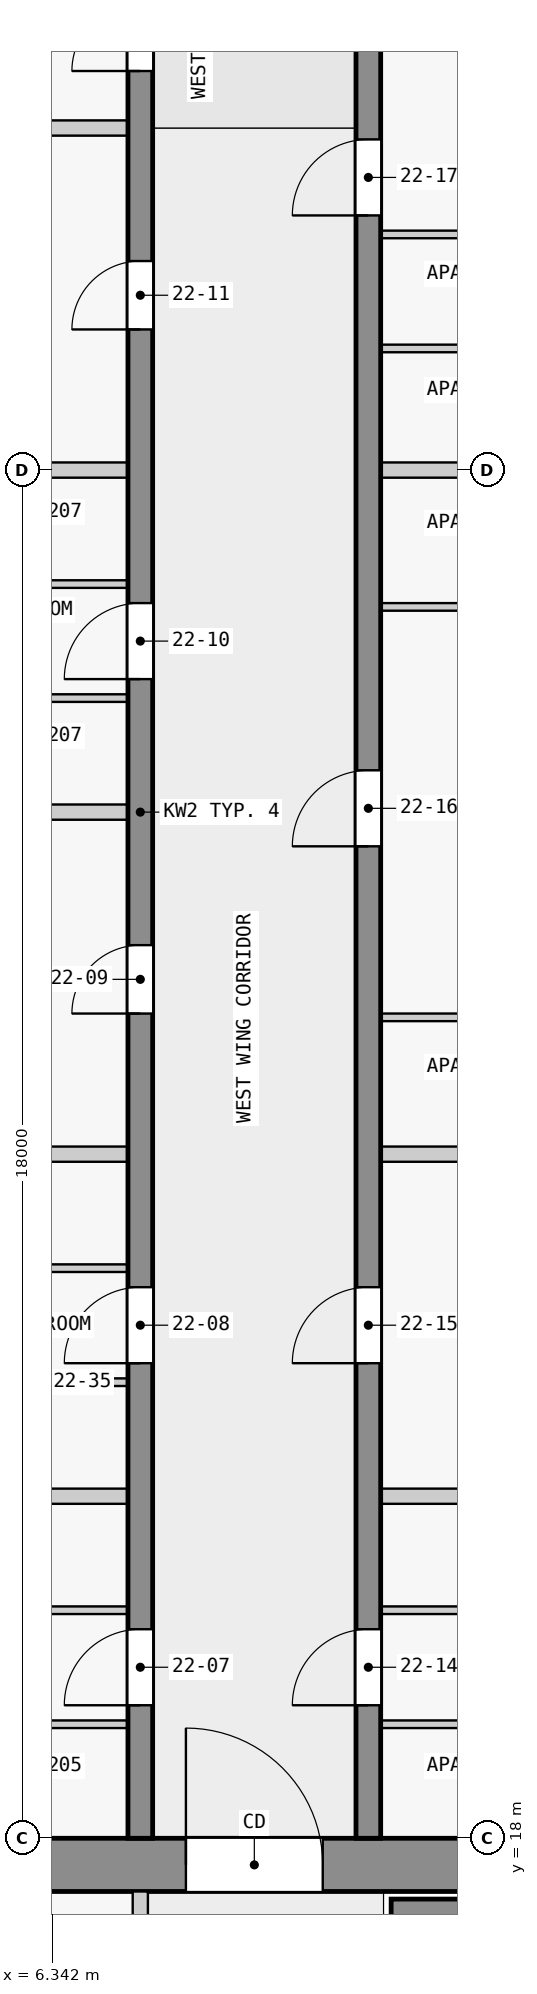
"""IFC4 building model, lengths in metres.
Left out: names, types, materials, properties, quantities, classifications, styles, units other than length and angle.
Written with IfcOpenShell. Run it as: python <this file> out.ifc"""

import sys

from ifc_helpers import new_model, si_unit, direction, frame, frame_2d, origin, place, context, subcontext, project, spatial, rectangle, extrude, element, fill, save


model = new_model("IFC4")
c1 = context("Model", 3, precision=1e-05, world=origin(), true_north=direction((0.0, 1.0)))
c2 = subcontext(c1, "Body", "Model", "MODEL_VIEW")
j1 = project(units=[si_unit("LENGTHUNIT", "METRE"), si_unit("PLANEANGLEUNIT", "RADIAN")], contexts=[c1])
p1 = place(None, origin())
s1 = spatial("IfcSite", under=j1, at=p1, CompositionType="ELEMENT")
p2 = place(p1, origin())
s2 = spatial("IfcBuilding", under=s1, at=p2, CompositionType="ELEMENT")
p3 = place(p2, frame((0.0, 0.0, 88.8)))
s3 = spatial("IfcBuildingStorey", under=s2, at=p3, CompositionType="ELEMENT", Elevation=88.8)
p4 = place(p3, frame((1.6, 17.65, 0.0), z_axis=(0.0, 0.0, 1.0), x_axis=(1.0, 0.0, 0.0)))
e1 = element("IfcWall", 1, at=p4, inside=s3, PredefinedType="SHEAR", context=c2, shape_type="SweptSolid", body=[
    extrude(rectangle(XDim=20.9, YDim=0.7, at=frame_2d((10.45, 0.0))), origin(), (0.0, 0.0, 1.0), 3.25),
])
p5 = place(p4, frame((6.5, 0.0, 0.0)))
e2 = element("IfcOpeningElement", 2, at=p5, cuts=e1, PredefinedType="OPENING", context=c2, shape_type="SweptSolid", body=[
    extrude(rectangle(XDim=1.8, YDim=2.1, at=frame_2d((0.9, 1.05))), frame((0.0, 0.36, 0.0), z_axis=(0.0, -1.0, 0.0), x_axis=(1.0, 0.0, 0.0)), (0.0, 0.0, 1.0), 0.72),
])
p6 = place(p3, frame((10.8, 17.05, 0.0), z_axis=(0.0, 0.0, 1.0), x_axis=(1.0, 0.0, 0.0)))
e3 = element("IfcWall", 3, at=p6, inside=s3, PredefinedType="SHEAR", context=c2, shape_type="SweptSolid", body=[
    extrude(rectangle(XDim=7.8, YDim=0.3, at=frame_2d((3.9, 0.0))), origin(), (0.0, 0.0, 1.0), 3.25),
])
p7 = place(p3, frame((7.5, 18.0, 0.0), z_axis=(0.0, 0.0, 1.0), x_axis=(0.0, 1.0, 0.0)))
e4 = element("IfcWall", 4, at=p7, inside=s3, PredefinedType="SHEAR", context=c2, shape_type="SweptSolid", body=[
    extrude(rectangle(XDim=27.0, YDim=0.325, at=frame_2d((13.5, 0.0))), origin(), (0.0, 0.0, 1.0), 3.25),
])
p8 = place(p7, frame((1.75, 0.0, 0.0)))
e5 = element("IfcOpeningElement", 5, at=p8, cuts=e4, PredefinedType="OPENING", context=c2, shape_type="SweptSolid", body=[
    extrude(rectangle(XDim=1.0, YDim=2.1, at=frame_2d((0.5, 1.05))), frame((0.0, 0.172, 0.0), z_axis=(0.0, -1.0, 0.0), x_axis=(1.0, 0.0, 0.0)), (0.0, 0.0, 1.0), 0.345),
])
p9 = place(p7, frame((6.25, 0.0, 0.0)))
e6 = element("IfcOpeningElement", 6, at=p9, cuts=e4, PredefinedType="OPENING", context=c2, shape_type="SweptSolid", body=[
    extrude(rectangle(XDim=1.0, YDim=2.1, at=frame_2d((0.5, 1.05))), frame((0.0, 0.172, 0.0), z_axis=(0.0, -1.0, 0.0), x_axis=(1.0, 0.0, 0.0)), (0.0, 0.0, 1.0), 0.345),
])
p10 = place(p7, frame((10.85, 0.0, 0.0)))
e7 = element("IfcOpeningElement", 7, at=p10, cuts=e4, PredefinedType="OPENING", context=c2, shape_type="SweptSolid", body=[
    extrude(rectangle(XDim=0.9, YDim=2.1, at=frame_2d((0.45, 1.05))), frame((0.0, 0.172, 0.0), z_axis=(0.0, -1.0, 0.0), x_axis=(1.0, 0.0, 0.0)), (0.0, 0.0, 1.0), 0.345),
])
p11 = place(p7, frame((15.25, 0.0, 0.0)))
e8 = element("IfcOpeningElement", 8, at=p11, cuts=e4, PredefinedType="OPENING", context=c2, shape_type="SweptSolid", body=[
    extrude(rectangle(XDim=1.0, YDim=2.1, at=frame_2d((0.5, 1.05))), frame((0.0, 0.172, 0.0), z_axis=(0.0, -1.0, 0.0), x_axis=(1.0, 0.0, 0.0)), (0.0, 0.0, 1.0), 0.345),
])
p12 = place(p7, frame((19.85, 0.0, 0.0)))
e9 = element("IfcOpeningElement", 9, at=p12, cuts=e4, PredefinedType="OPENING", context=c2, shape_type="SweptSolid", body=[
    extrude(rectangle(XDim=0.9, YDim=2.1, at=frame_2d((0.45, 1.05))), frame((0.0, 0.172, 0.0), z_axis=(0.0, -1.0, 0.0), x_axis=(1.0, 0.0, 0.0)), (0.0, 0.0, 1.0), 0.345),
])
p13 = place(p7, frame((23.25, 0.0, 0.0)))
e10 = element("IfcOpeningElement", 10, at=p13, cuts=e4, PredefinedType="OPENING", context=c2, shape_type="SweptSolid", body=[
    extrude(rectangle(XDim=0.9, YDim=2.1, at=frame_2d((0.45, 1.05))), frame((0.0, 0.172, 0.0), z_axis=(0.0, -1.0, 0.0), x_axis=(1.0, 0.0, 0.0)), (0.0, 0.0, 1.0), 0.345),
])
p14 = place(p7, frame((25.45, 0.0, 0.0)))
e11 = element("IfcOpeningElement", 11, at=p14, cuts=e4, PredefinedType="OPENING", context=c2, shape_type="SweptSolid", body=[
    extrude(rectangle(XDim=1.0, YDim=2.1, at=frame_2d((0.5, 1.05))), frame((0.0, 0.172, 0.0), z_axis=(0.0, -1.0, 0.0), x_axis=(1.0, 0.0, 0.0)), (0.0, 0.0, 1.0), 0.345),
])
p15 = place(p3, frame((10.5, 18.0, 0.0), z_axis=(0.0, 0.0, 1.0), x_axis=(0.0, 1.0, 0.0)))
e12 = element("IfcWall", 12, at=p15, inside=s3, PredefinedType="SHEAR", context=c2, shape_type="SweptSolid", body=[
    extrude(rectangle(XDim=27.0, YDim=0.325, at=frame_2d((13.5, 0.0))), origin(), (0.0, 0.0, 1.0), 3.25),
])
p16 = place(p15, frame((1.75, 0.0, 0.0)))
e13 = element("IfcOpeningElement", 13, at=p16, cuts=e12, PredefinedType="OPENING", context=c2, shape_type="SweptSolid", body=[
    extrude(rectangle(XDim=1.0, YDim=2.1, at=frame_2d((0.5, 1.05))), frame((0.0, 0.172, 0.0), z_axis=(0.0, -1.0, 0.0), x_axis=(1.0, 0.0, 0.0)), (0.0, 0.0, 1.0), 0.345),
])
p17 = place(p15, frame((6.25, 0.0, 0.0)))
e14 = element("IfcOpeningElement", 14, at=p17, cuts=e12, PredefinedType="OPENING", context=c2, shape_type="SweptSolid", body=[
    extrude(rectangle(XDim=1.0, YDim=2.1, at=frame_2d((0.5, 1.05))), frame((0.0, 0.172, 0.0), z_axis=(0.0, -1.0, 0.0), x_axis=(1.0, 0.0, 0.0)), (0.0, 0.0, 1.0), 0.345),
])
p18 = place(p15, frame((13.05, 0.0, 0.0)))
e15 = element("IfcOpeningElement", 15, at=p18, cuts=e12, PredefinedType="OPENING", context=c2, shape_type="SweptSolid", body=[
    extrude(rectangle(XDim=1.0, YDim=2.1, at=frame_2d((0.5, 1.05))), frame((0.0, 0.172, 0.0), z_axis=(0.0, -1.0, 0.0), x_axis=(1.0, 0.0, 0.0)), (0.0, 0.0, 1.0), 0.345),
])
p19 = place(p15, frame((21.35, 0.0, 0.0)))
e16 = element("IfcOpeningElement", 16, at=p19, cuts=e12, PredefinedType="OPENING", context=c2, shape_type="SweptSolid", body=[
    extrude(rectangle(XDim=1.0, YDim=2.1, at=frame_2d((0.5, 1.05))), frame((0.0, 0.172, 0.0), z_axis=(0.0, -1.0, 0.0), x_axis=(1.0, 0.0, 0.0)), (0.0, 0.0, 1.0), 0.345),
])
p20 = place(p3, frame((7.5, 10.1, 0.0), z_axis=(0.0, 0.0, 1.0), x_axis=(0.0, 1.0, 0.0)))
e17 = element("IfcWall", 17, at=p20, inside=s3, PredefinedType="PARTITIONING", context=c2, shape_type="SweptSolid", body=[
    extrude(rectangle(XDim=7.2, YDim=0.2, at=frame_2d((3.6, 0.0))), origin(), (0.0, 0.0, 1.0), 3.25),
])
p21 = place(p20, frame((0.75, 0.0, 0.0)))
e18 = element("IfcOpeningElement", 18, at=p21, cuts=e17, PredefinedType="OPENING", context=c2, shape_type="SweptSolid", body=[
    extrude(rectangle(XDim=0.9, YDim=2.1, at=frame_2d((0.45, 1.05))), frame((0.0, 0.11, 0.0), z_axis=(0.0, -1.0, 0.0), x_axis=(1.0, 0.0, 0.0)), (0.0, 0.0, 1.0), 0.22),
])
p22 = place(p20, frame((3.175, 0.0, 0.0)))
e19 = element("IfcOpeningElement", 19, at=p22, cuts=e17, PredefinedType="OPENING", context=c2, shape_type="SweptSolid", body=[
    extrude(rectangle(XDim=0.9, YDim=2.1, at=frame_2d((0.45, 1.05))), frame((0.0, 0.11, 0.0), z_axis=(0.0, -1.0, 0.0), x_axis=(1.0, 0.0, 0.0)), (0.0, 0.0, 1.0), 0.22),
])
p23 = place(p20, frame((5.25, 0.0, 0.0)))
e20 = element("IfcOpeningElement", 20, at=p23, cuts=e17, PredefinedType="OPENING", context=c2, shape_type="SweptSolid", body=[
    extrude(rectangle(XDim=0.9, YDim=2.1, at=frame_2d((0.45, 1.05))), frame((0.0, 0.11, 0.0), z_axis=(0.0, -1.0, 0.0), x_axis=(1.0, 0.0, 0.0)), (0.0, 0.0, 1.0), 0.22),
])
p24 = place(p3, frame((7.337, 19.5, 0.0), z_axis=(0.0, 0.0, 1.0), x_axis=(-1.0, 0.0, 0.0)))
e21 = element("IfcWall", 21, at=p24, inside=s3, PredefinedType="PARTITIONING", context=c2, shape_type="SweptSolid", body=[
    extrude(rectangle(XDim=3.4, YDim=0.1, at=frame_2d((1.7, 0.0))), origin(), (0.0, 0.0, 1.0), 3.25),
])
p25 = place(p24, frame((1.25, 0.0, 0.0)))
e22 = element("IfcOpeningElement", 22, at=p25, cuts=e21, PredefinedType="OPENING", context=c2, shape_type="SweptSolid", body=[
    extrude(rectangle(XDim=0.9, YDim=2.1, at=frame_2d((0.45, 1.05))), frame((0.0, 0.06, 0.0), z_axis=(0.0, -1.0, 0.0), x_axis=(1.0, 0.0, 0.0)), (0.0, 0.0, 1.0), 0.12),
])
p26 = place(p3, frame((14.062, 19.5, 0.0), z_axis=(0.0, 0.0, 1.0), x_axis=(-1.0, 0.0, 0.0)))
e23 = element("IfcWall", 23, at=p26, inside=s3, PredefinedType="PARTITIONING", context=c2, shape_type="SweptSolid", body=[
    extrude(rectangle(XDim=3.4, YDim=0.1, at=frame_2d((1.7, 0.0))), origin(), (0.0, 0.0, 1.0), 3.25),
])
p27 = place(p26, frame((1.25, 0.0, 0.0)))
e24 = element("IfcOpeningElement", 24, at=p27, cuts=e23, PredefinedType="OPENING", context=c2, shape_type="SweptSolid", body=[
    extrude(rectangle(XDim=0.9, YDim=2.1, at=frame_2d((0.45, 1.05))), frame((0.0, 0.06, 0.0), z_axis=(0.0, -1.0, 0.0), x_axis=(1.0, 0.0, 0.0)), (0.0, 0.0, 1.0), 0.12),
])
p28 = place(p3, frame((3.938, 21.0, 0.0), z_axis=(0.0, 0.0, 1.0), x_axis=(1.0, 0.0, 0.0)))
e25 = element("IfcWall", 25, at=p28, inside=s3, PredefinedType="PARTITIONING", context=c2, shape_type="SweptSolid", body=[
    extrude(rectangle(XDim=3.4, YDim=0.1, at=frame_2d((1.7, 0.0))), origin(), (0.0, 0.0, 1.0), 3.25),
])
p29 = place(p28, frame((1.25, 0.0, 0.0)))
e26 = element("IfcOpeningElement", 26, at=p29, cuts=e25, PredefinedType="OPENING", context=c2, shape_type="SweptSolid", body=[
    extrude(rectangle(XDim=0.9, YDim=2.1, at=frame_2d((0.45, 1.05))), frame((0.0, 0.06, 0.0), z_axis=(0.0, -1.0, 0.0), x_axis=(1.0, 0.0, 0.0)), (0.0, 0.0, 1.0), 0.12),
])
p30 = place(p3, frame((10.663, 21.0, 0.0), z_axis=(0.0, 0.0, 1.0), x_axis=(1.0, 0.0, 0.0)))
e27 = element("IfcWall", 27, at=p30, inside=s3, PredefinedType="PARTITIONING", context=c2, shape_type="SweptSolid", body=[
    extrude(rectangle(XDim=3.4, YDim=0.1, at=frame_2d((1.7, 0.0))), origin(), (0.0, 0.0, 1.0), 3.25),
])
p31 = place(p30, frame((1.25, 0.0, 0.0)))
e28 = element("IfcOpeningElement", 28, at=p31, cuts=e27, PredefinedType="OPENING", context=c2, shape_type="SweptSolid", body=[
    extrude(rectangle(XDim=0.9, YDim=2.1, at=frame_2d((0.45, 1.05))), frame((0.0, 0.06, 0.0), z_axis=(0.0, -1.0, 0.0), x_axis=(1.0, 0.0, 0.0)), (0.0, 0.0, 1.0), 0.12),
])
for number, where, z_axis, x_axis in (
    (29, (7.337, 22.5, 0.0), (0.0, 0.0, 1.0), (-1.0, 0.0, 0.0)),
    (30, (13.962, 22.5, 0.0), (0.0, 0.0, 1.0), (-1.0, 0.0, 0.0)),
):
    element("IfcWall", number, at=place(p3, frame(where, z_axis=z_axis, x_axis=x_axis)), inside=s3, PredefinedType="PARTITIONING", context=c2, shape_type="SweptSolid", body=[
        extrude(rectangle(XDim=3.3, YDim=0.2, at=frame_2d((1.65, 0.0))), origin(), (0.0, 0.0, 1.0), 3.25),
    ])
p32 = place(p3, frame((7.337, 24.0, 0.0), z_axis=(0.0, 0.0, 1.0), x_axis=(-1.0, 0.0, 0.0)))
e31 = element("IfcWall", 31, at=p32, inside=s3, PredefinedType="PARTITIONING", context=c2, shape_type="SweptSolid", body=[
    extrude(rectangle(XDim=3.4, YDim=0.1, at=frame_2d((1.7, 0.0))), origin(), (0.0, 0.0, 1.0), 3.25),
])
p33 = place(p32, frame((1.25, 0.0, 0.0)))
e32 = element("IfcOpeningElement", 32, at=p33, cuts=e31, PredefinedType="OPENING", context=c2, shape_type="SweptSolid", body=[
    extrude(rectangle(XDim=0.9, YDim=2.1, at=frame_2d((0.45, 1.05))), frame((0.0, 0.06, 0.0), z_axis=(0.0, -1.0, 0.0), x_axis=(1.0, 0.0, 0.0)), (0.0, 0.0, 1.0), 0.12),
])
p34 = place(p3, frame((3.938, 25.5, 0.0), z_axis=(0.0, 0.0, 1.0), x_axis=(1.0, 0.0, 0.0)))
e33 = element("IfcWall", 33, at=p34, inside=s3, PredefinedType="PARTITIONING", context=c2, shape_type="SweptSolid", body=[
    extrude(rectangle(XDim=3.4, YDim=0.1, at=frame_2d((1.7, 0.0))), origin(), (0.0, 0.0, 1.0), 3.25),
])
p35 = place(p34, frame((1.25, 0.0, 0.0)))
e34 = element("IfcOpeningElement", 34, at=p35, cuts=e33, PredefinedType="OPENING", context=c2, shape_type="SweptSolid", body=[
    extrude(rectangle(XDim=0.9, YDim=2.1, at=frame_2d((0.45, 1.05))), frame((0.0, 0.06, 0.0), z_axis=(0.0, -1.0, 0.0), x_axis=(1.0, 0.0, 0.0)), (0.0, 0.0, 1.0), 0.12),
])
p36 = place(p3, frame((7.337, 27.0, 0.0), z_axis=(0.0, 0.0, 1.0), x_axis=(-1.0, 0.0, 0.0)))
e35 = element("IfcWall", 35, at=p36, inside=s3, PredefinedType="PARTITIONING", context=c2, shape_type="SweptSolid", body=[
    extrude(rectangle(XDim=3.3, YDim=0.2, at=frame_2d((1.65, 0.0))), origin(), (0.0, 0.0, 1.0), 3.25),
])
p37 = place(p3, frame((18.08, 27.0, 0.0), z_axis=(0.0, 0.0, 1.0), x_axis=(-1.0, 0.0, 0.0)))
e36 = element("IfcWall", 36, at=p37, inside=s3, PredefinedType="PARTITIONING", context=c2, shape_type="SweptSolid", body=[
    extrude(rectangle(XDim=7.417, YDim=0.2, at=frame_2d((3.709, 0.0))), origin(), (0.0, 0.0, 1.0), 3.25),
])
p38 = place(p3, frame((14.062, 28.8, 0.0), z_axis=(0.0, 0.0, 1.0), x_axis=(-1.0, 0.0, 0.0)))
e37 = element("IfcWall", 37, at=p38, inside=s3, PredefinedType="PARTITIONING", context=c2, shape_type="SweptSolid", body=[
    extrude(rectangle(XDim=3.4, YDim=0.1, at=frame_2d((1.7, 0.0))), origin(), (0.0, 0.0, 1.0), 3.25),
])
p39 = place(p38, frame((1.25, 0.0, 0.0)))
e38 = element("IfcOpeningElement", 38, at=p39, cuts=e37, PredefinedType="OPENING", context=c2, shape_type="SweptSolid", body=[
    extrude(rectangle(XDim=0.9, YDim=2.1, at=frame_2d((0.45, 1.05))), frame((0.0, 0.06, 0.0), z_axis=(0.0, -1.0, 0.0), x_axis=(1.0, 0.0, 0.0)), (0.0, 0.0, 1.0), 0.12),
])
p40 = place(p3, frame((7.337, 31.5, 0.0), z_axis=(0.0, 0.0, 1.0), x_axis=(-1.0, 0.0, 0.0)))
e39 = element("IfcWall", 39, at=p40, inside=s3, PredefinedType="PARTITIONING", context=c2, shape_type="SweptSolid", body=[
    extrude(rectangle(XDim=7.188, YDim=0.2, at=frame_2d((3.594, 0.0))), origin(), (0.0, 0.0, 1.0), 3.25),
])
p41 = place(p3, frame((7.337, 33.0, 0.0), z_axis=(0.0, 0.0, 1.0), x_axis=(-1.0, 0.0, 0.0)))
e40 = element("IfcWall", 40, at=p41, inside=s3, PredefinedType="PARTITIONING", context=c2, shape_type="SweptSolid", body=[
    extrude(rectangle(XDim=3.4, YDim=0.1, at=frame_2d((1.7, 0.0))), origin(), (0.0, 0.0, 1.0), 3.25),
])
p42 = place(p41, frame((1.25, 0.0, 0.0)))
e41 = element("IfcOpeningElement", 41, at=p42, cuts=e40, PredefinedType="OPENING", context=c2, shape_type="SweptSolid", body=[
    extrude(rectangle(XDim=0.9, YDim=2.1, at=frame_2d((0.45, 1.05))), frame((0.0, 0.06, 0.0), z_axis=(0.0, -1.0, 0.0), x_axis=(1.0, 0.0, 0.0)), (0.0, 0.0, 1.0), 0.12),
])
p43 = place(p3, frame((10.663, 34.2, 0.0), z_axis=(0.0, 0.0, 1.0), x_axis=(1.0, 0.0, 0.0)))
e42 = element("IfcWall", 42, at=p43, inside=s3, PredefinedType="PARTITIONING", context=c2, shape_type="SweptSolid", body=[
    extrude(rectangle(XDim=3.35, YDim=0.1, at=frame_2d((1.675, 0.0))), origin(), (0.0, 0.0, 1.0), 3.25),
])
p44 = place(p43, frame((1.25, 0.0, 0.0)))
e43 = element("IfcOpeningElement", 43, at=p44, cuts=e42, PredefinedType="OPENING", context=c2, shape_type="SweptSolid", body=[
    extrude(rectangle(XDim=0.9, YDim=2.1, at=frame_2d((0.45, 1.05))), frame((0.0, 0.06, 0.0), z_axis=(0.0, -1.0, 0.0), x_axis=(1.0, 0.0, 0.0)), (0.0, 0.0, 1.0), 0.12),
])
p45 = place(p3, frame((3.938, 34.5, 0.0), z_axis=(0.0, 0.0, 1.0), x_axis=(1.0, 0.0, 0.0)))
e44 = element("IfcWall", 44, at=p45, inside=s3, PredefinedType="PARTITIONING", context=c2, shape_type="SweptSolid", body=[
    extrude(rectangle(XDim=3.4, YDim=0.1, at=frame_2d((1.7, 0.0))), origin(), (0.0, 0.0, 1.0), 3.25),
])
p46 = place(p45, frame((1.25, 0.0, 0.0)))
e45 = element("IfcOpeningElement", 45, at=p46, cuts=e44, PredefinedType="OPENING", context=c2, shape_type="SweptSolid", body=[
    extrude(rectangle(XDim=0.9, YDim=2.1, at=frame_2d((0.45, 1.05))), frame((0.0, 0.06, 0.0), z_axis=(0.0, -1.0, 0.0), x_axis=(1.0, 0.0, 0.0)), (0.0, 0.0, 1.0), 0.12),
])
for number, where, z_axis, x_axis in (
    (46, (7.337, 36.0, 0.0), (0.0, 0.0, 1.0), (-1.0, 0.0, 0.0)),
    (47, (14.062, 36.0, 0.0), (0.0, 0.0, 1.0), (-1.0, 0.0, 0.0)),
):
    element("IfcWall", number, at=place(p3, frame(where, z_axis=z_axis, x_axis=x_axis)), inside=s3, PredefinedType="PARTITIONING", context=c2, shape_type="SweptSolid", body=[
        extrude(rectangle(XDim=3.4, YDim=0.2, at=frame_2d((1.7, 0.0))), origin(), (0.0, 0.0, 1.0), 3.25),
    ])
p47 = place(p3, frame((14.012, 37.6, 0.0), z_axis=(0.0, 0.0, 1.0), x_axis=(-1.0, 0.0, 0.0)))
e48 = element("IfcWall", 48, at=p47, inside=s3, PredefinedType="PARTITIONING", context=c2, shape_type="SweptSolid", body=[
    extrude(rectangle(XDim=3.35, YDim=0.1, at=frame_2d((1.675, 0.0))), origin(), (0.0, 0.0, 1.0), 3.25),
])
p48 = place(p3, frame((14.012, 39.1, 0.0), z_axis=(0.0, 0.0, 1.0), x_axis=(-1.0, 0.0, 0.0)))
e49 = element("IfcWall", 49, at=p48, inside=s3, PredefinedType="PARTITIONING", context=c2, shape_type="SweptSolid", body=[
    extrude(rectangle(XDim=3.35, YDim=0.1, at=frame_2d((1.675, 0.0))), origin(), (0.0, 0.0, 1.0), 3.25),
])
p49 = place(p48, frame((1.25, 0.0, 0.0)))
e50 = element("IfcOpeningElement", 50, at=p49, cuts=e49, PredefinedType="OPENING", context=c2, shape_type="SweptSolid", body=[
    extrude(rectangle(XDim=0.9, YDim=2.1, at=frame_2d((0.45, 1.05))), frame((0.0, 0.06, 0.0), z_axis=(0.0, -1.0, 0.0), x_axis=(1.0, 0.0, 0.0)), (0.0, 0.0, 1.0), 0.12),
])
p50 = place(p3, frame((7.337, 40.5, 0.0), z_axis=(0.0, 0.0, 1.0), x_axis=(-1.0, 0.0, 0.0)))
e51 = element("IfcWall", 51, at=p50, inside=s3, PredefinedType="PARTITIONING", context=c2, shape_type="SweptSolid", body=[
    extrude(rectangle(XDim=7.417, YDim=0.2, at=frame_2d((3.709, 0.0))), origin(), (0.0, 0.0, 1.0), 3.25),
])
p51 = place(p5, origin())
e52 = element("IfcDoor", 52, at=p51, inside=s3, OperationType="DOUBLE_DOOR_SINGLE_SWING", PredefinedType="DOOR", context=c2, shape_type="SweptSolid", body=[
    extrude(rectangle(XDim=1.8, YDim=2.1, at=frame_2d((0.9, 1.05))), frame((0.0, 0.025, 0.0), z_axis=(0.0, -1.0, 0.0), x_axis=(1.0, 0.0, 0.0)), (0.0, 0.0, 1.0), 0.05),
])
fill(e2, e52)
p52 = place(p8, origin())
e53 = element("IfcDoor", 53, at=p52, inside=s3, OperationType="SINGLE_SWING_LEFT", PredefinedType="DOOR", context=c2, shape_type="SweptSolid", body=[
    extrude(rectangle(XDim=1.0, YDim=2.1, at=frame_2d((0.5, 1.05))), frame((0.0, 0.025, 0.0), z_axis=(0.0, -1.0, 0.0), x_axis=(1.0, 0.0, 0.0)), (0.0, 0.0, 1.0), 0.05),
])
fill(e5, e53)
p53 = place(p9, origin())
e54 = element("IfcDoor", 54, at=p53, inside=s3, OperationType="SINGLE_SWING_LEFT", PredefinedType="DOOR", context=c2, shape_type="SweptSolid", body=[
    extrude(rectangle(XDim=1.0, YDim=2.1, at=frame_2d((0.5, 1.05))), frame((0.0, 0.025, 0.0), z_axis=(0.0, -1.0, 0.0), x_axis=(1.0, 0.0, 0.0)), (0.0, 0.0, 1.0), 0.05),
])
fill(e6, e54)
p54 = place(p10, origin())
e55 = element("IfcDoor", 55, at=p54, inside=s3, OperationType="SINGLE_SWING_LEFT", PredefinedType="DOOR", context=c2, shape_type="SweptSolid", body=[
    extrude(rectangle(XDim=0.9, YDim=2.1, at=frame_2d((0.45, 1.05))), frame((0.0, 0.025, 0.0), z_axis=(0.0, -1.0, 0.0), x_axis=(1.0, 0.0, 0.0)), (0.0, 0.0, 1.0), 0.05),
])
fill(e7, e55)
p55 = place(p11, origin())
e56 = element("IfcDoor", 56, at=p55, inside=s3, OperationType="SINGLE_SWING_RIGHT", PredefinedType="DOOR", context=c2, shape_type="SweptSolid", body=[
    extrude(rectangle(XDim=1.0, YDim=2.1, at=frame_2d((0.5, 1.05))), frame((0.0, 0.025, 0.0), z_axis=(0.0, -1.0, 0.0), x_axis=(1.0, 0.0, 0.0)), (0.0, 0.0, 1.0), 0.05),
])
fill(e8, e56)
p56 = place(p12, origin())
e57 = element("IfcDoor", 57, at=p56, inside=s3, OperationType="SINGLE_SWING_RIGHT", PredefinedType="DOOR", context=c2, shape_type="SweptSolid", body=[
    extrude(rectangle(XDim=0.9, YDim=2.1, at=frame_2d((0.45, 1.05))), frame((0.0, 0.025, 0.0), z_axis=(0.0, -1.0, 0.0), x_axis=(1.0, 0.0, 0.0)), (0.0, 0.0, 1.0), 0.05),
])
fill(e9, e57)
p57 = place(p13, origin())
e58 = element("IfcDoor", 58, at=p57, inside=s3, OperationType="SINGLE_SWING_RIGHT", PredefinedType="DOOR", context=c2, shape_type="SweptSolid", body=[
    extrude(rectangle(XDim=0.9, YDim=2.1, at=frame_2d((0.45, 1.05))), frame((0.0, 0.025, 0.0), z_axis=(0.0, -1.0, 0.0), x_axis=(1.0, 0.0, 0.0)), (0.0, 0.0, 1.0), 0.05),
])
fill(e10, e58)
p58 = place(p16, origin())
e59 = element("IfcDoor", 59, at=p58, inside=s3, OperationType="SINGLE_SWING_LEFT", PredefinedType="DOOR", context=c2, shape_type="SweptSolid", body=[
    extrude(rectangle(XDim=1.0, YDim=2.1, at=frame_2d((0.5, 1.05))), frame((0.0, 0.025, 0.0), z_axis=(0.0, -1.0, 0.0), x_axis=(1.0, 0.0, 0.0)), (0.0, 0.0, 1.0), 0.05),
])
fill(e13, e59)
p59 = place(p17, origin())
e60 = element("IfcDoor", 60, at=p59, inside=s3, OperationType="SINGLE_SWING_LEFT", PredefinedType="DOOR", context=c2, shape_type="SweptSolid", body=[
    extrude(rectangle(XDim=1.0, YDim=2.1, at=frame_2d((0.5, 1.05))), frame((0.0, 0.025, 0.0), z_axis=(0.0, -1.0, 0.0), x_axis=(1.0, 0.0, 0.0)), (0.0, 0.0, 1.0), 0.05),
])
fill(e14, e60)
p60 = place(p18, origin())
e61 = element("IfcDoor", 61, at=p60, inside=s3, OperationType="SINGLE_SWING_RIGHT", PredefinedType="DOOR", context=c2, shape_type="SweptSolid", body=[
    extrude(rectangle(XDim=1.0, YDim=2.1, at=frame_2d((0.5, 1.05))), frame((0.0, 0.025, 0.0), z_axis=(0.0, -1.0, 0.0), x_axis=(1.0, 0.0, 0.0)), (0.0, 0.0, 1.0), 0.05),
])
fill(e15, e61)
p61 = place(p19, origin())
e62 = element("IfcDoor", 62, at=p61, inside=s3, OperationType="SINGLE_SWING_RIGHT", PredefinedType="DOOR", context=c2, shape_type="SweptSolid", body=[
    extrude(rectangle(XDim=1.0, YDim=2.1, at=frame_2d((0.5, 1.05))), frame((0.0, 0.025, 0.0), z_axis=(0.0, -1.0, 0.0), x_axis=(1.0, 0.0, 0.0)), (0.0, 0.0, 1.0), 0.05),
])
fill(e16, e62)
save(model, sys.argv[1])
